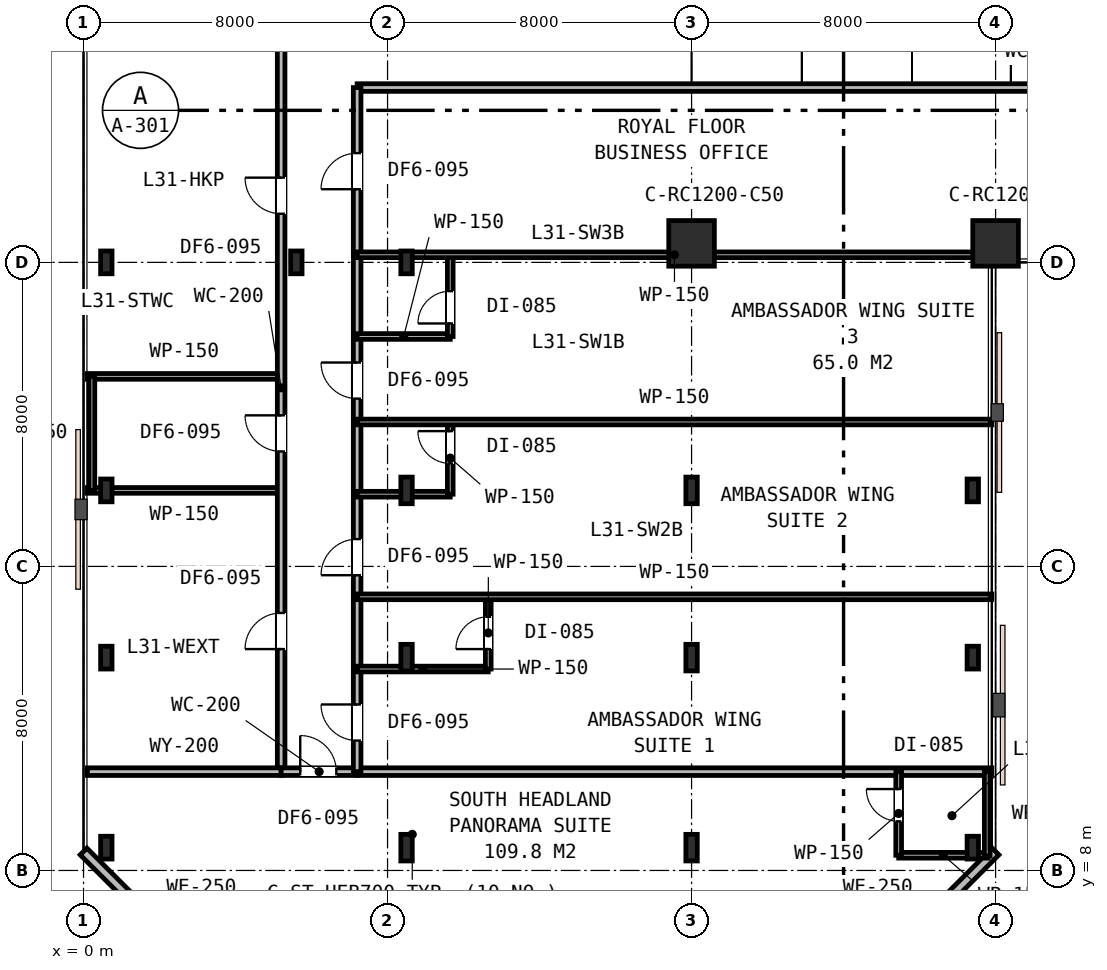
"""IFC4 building model, lengths in metres.
Left out: names, types, materials, properties, quantities, classifications, styles, units other than length and angle.
Written with IfcOpenShell. Run it as: python <this file> out.ifc"""

import sys

from ifc_helpers import new_model, si_unit, direction, frame, frame_2d, origin, origin_2d, place, context, subcontext, project, spatial, rectangle, i_section, extrude, element, fill, save


model = new_model("IFC4")
c1 = context("Model", 3, precision=1e-05, world=origin(), true_north=direction((0.0, 1.0)))
c2 = subcontext(c1, "Body", "Model", "MODEL_VIEW")
j1 = project(units=[si_unit("LENGTHUNIT", "METRE"), si_unit("PLANEANGLEUNIT", "RADIAN")], contexts=[c1])
p1 = place(None, origin())
s1 = spatial("IfcSite", under=j1, at=p1, CompositionType="ELEMENT")
p2 = place(p1, origin())
s2 = spatial("IfcBuilding", under=s1, at=p2, CompositionType="ELEMENT")
p3 = place(p2, frame((0.0, 0.0, 122.4)))
s3 = spatial("IfcBuildingStorey", under=s2, at=p3, CompositionType="ELEMENT", Elevation=122.4)
p4 = place(p3, frame((8.5, 24.0, 0.0), z_axis=(0.0, 0.0, 1.0), x_axis=(1.0, 0.0, 0.0)))
e1 = element("IfcColumn", 1, at=p4, inside=s3, PredefinedType="COLUMN", context=c2, shape_type="SweptSolid", body=[
    extrude(i_section(OverallWidth=0.3, OverallDepth=0.6, WebThickness=0.015, FlangeThickness=0.03, FilletRadius=0.027, at=origin_2d()), origin(), (0.0, 0.0, 1.0), 3.6),
])
for number, where, z_axis, x_axis in (
    (2, (16.0, 24.5, 0.0), (0.0, 0.0, 1.0), (1.0, 0.0, 0.0)),
    (3, (24.0, 24.5, 0.0), (0.0, 0.0, 1.0), (1.0, 0.0, 0.0)),
):
    element("IfcColumn", number, at=place(p3, frame(where, z_axis=z_axis, x_axis=x_axis)), inside=s3, PredefinedType="COLUMN", context=c2, shape_type="SweptSolid", body=[
        extrude(rectangle(XDim=1.2, YDim=1.2, at=origin_2d()), origin(), (0.0, 0.0, 1.0), 3.6),
    ])
for number, where, z_axis, x_axis in (
    (4, (5.6, 24.0, 0.0), (0.0, 0.0, 1.0), (1.0, 0.0, 0.0)),
    (5, (0.6, 24.0, 0.0), (0.0, 0.0, 1.0), (1.0, 0.0, 0.0)),
    (6, (0.6, 8.6, 0.0), (0.0, 0.0, 1.0), (1.0, 0.0, 0.0)),
    (7, (0.6, 13.6, 0.0), (0.0, 0.0, 1.0), (1.0, 0.0, 0.0)),
    (8, (0.6, 18.0, 0.0), (0.0, 0.0, 1.0), (1.0, 0.0, 0.0)),
    (9, (23.4, 8.6, 0.0), (0.0, 0.0, 1.0), (1.0, 0.0, 0.0)),
    (10, (23.4, 13.6, 0.0), (0.0, 0.0, 1.0), (1.0, 0.0, 0.0)),
    (11, (23.4, 18.0, 0.0), (0.0, 0.0, 1.0), (1.0, 0.0, 0.0)),
):
    element("IfcColumn", number, at=place(p3, frame(where, z_axis=z_axis, x_axis=x_axis)), inside=s3, PredefinedType="COLUMN", context=c2, shape_type="SweptSolid", body=[
        extrude(i_section(OverallWidth=0.3, OverallDepth=0.6, WebThickness=0.015, FlangeThickness=0.03, FilletRadius=0.027, at=origin_2d()), origin(), (0.0, 0.0, 1.0), 3.6),
    ])
for number, where, z_axis, x_axis in (
    (12, (8.5, 8.6, 0.0), (0.0, 0.0, 1.0), (1.0, 0.0, 0.0)),
    (13, (16.0, 8.6, 0.0), (0.0, 0.0, 1.0), (1.0, 0.0, 0.0)),
    (14, (8.5, 13.6, 0.0), (0.0, 0.0, 1.0), (1.0, 0.0, 0.0)),
    (15, (16.0, 13.6, 0.0), (0.0, 0.0, 1.0), (1.0, 0.0, 0.0)),
    (16, (8.5, 18.0, 0.0), (0.0, 0.0, 1.0), (1.0, 0.0, 0.0)),
    (17, (16.0, 18.0, 0.0), (0.0, 0.0, 1.0), (1.0, 0.0, 0.0)),
):
    element("IfcColumn", number, at=place(p3, frame(where, z_axis=z_axis, x_axis=x_axis)), inside=s3, PredefinedType="COLUMN", context=c2, shape_type="SweptSolid", body=[
        extrude(i_section(OverallWidth=0.3, OverallDepth=0.7, WebThickness=0.017, FlangeThickness=0.032, FilletRadius=0.027, at=origin_2d()), origin(), (0.0, 0.0, 1.0), 3.6),
    ])
p5 = place(p3, frame((20.5, 5.0, 0.0), z_axis=(0.0, 0.0, 1.0), x_axis=(0.707106781187, 0.707106781187, 0.0)))
e18 = element("IfcWall", 18, at=p5, inside=s3, PredefinedType="STANDARD", context=c2, shape_type="SweptSolid", body=[
    extrude(rectangle(XDim=4.95, YDim=0.25, at=frame_2d((2.475, 0.0))), origin(), (0.0, 0.0, 1.0), 3.33),
])
p6 = place(p5, frame((1.465, 0.0, 0.75)))
e19 = element("IfcOpeningElement", 19, at=p6, cuts=e18, PredefinedType="OPENING", context=c2, shape_type="SweptSolid", body=[
    extrude(rectangle(XDim=1.8, YDim=1.85, at=frame_2d((0.9, 0.925))), frame((0.0, 0.135, 0.0), z_axis=(0.0, -1.0, 0.0), x_axis=(1.0, 0.0, 0.0)), (0.0, 0.0, 1.0), 0.27),
])
p7 = place(p3, frame((0.0, 8.5, 0.0), z_axis=(0.0, 0.0, 1.0), x_axis=(0.707106781187, -0.707106781187, 0.0)))
e20 = element("IfcWall", 20, at=p7, inside=s3, PredefinedType="STANDARD", context=c2, shape_type="SweptSolid", body=[
    extrude(rectangle(XDim=4.95, YDim=0.25, at=frame_2d((2.475, 0.0))), origin(), (0.0, 0.0, 1.0), 3.33),
])
p8 = place(p7, frame((1.575, 0.0, 0.75)))
e21 = element("IfcOpeningElement", 21, at=p8, cuts=e20, PredefinedType="OPENING", context=c2, shape_type="SweptSolid", body=[
    extrude(rectangle(XDim=1.8, YDim=1.85, at=frame_2d((0.9, 0.925))), frame((0.0, 0.135, 0.0), z_axis=(0.0, -1.0, 0.0), x_axis=(1.0, 0.0, 0.0)), (0.0, 0.0, 1.0), 0.27),
])
p9 = place(p3, frame((7.2, 28.6, 0.0), z_axis=(0.0, 0.0, 1.0), x_axis=(1.0, 0.0, 0.0)))
e22 = element("IfcWall", 22, at=p9, inside=s3, PredefinedType="PARTITIONING", context=c2, shape_type="SweptSolid", body=[
    extrude(rectangle(XDim=37.0, YDim=0.2, at=frame_2d((18.5, 0.0))), origin(), (0.0, 0.0, 1.0), 2.87),
])
p10 = place(p9, frame((19.71, 0.0, 0.0)))
e23 = element("IfcOpeningElement", 23, at=p10, cuts=e22, PredefinedType="OPENING", context=c2, shape_type="SweptSolid", body=[
    extrude(rectangle(XDim=0.95, YDim=2.15, at=frame_2d((0.475, 1.075))), frame((0.0, 0.11, 0.0), z_axis=(0.0, -1.0, 0.0), x_axis=(1.0, 0.0, 0.0)), (0.0, 0.0, 1.0), 0.22),
])
p11 = place(p9, frame((29.78, 0.0, 0.0)))
e24 = element("IfcOpeningElement", 24, at=p11, cuts=e22, PredefinedType="OPENING", context=c2, shape_type="SweptSolid", body=[
    extrude(rectangle(XDim=0.95, YDim=2.15, at=frame_2d((0.475, 1.075))), frame((0.0, 0.11, 0.0), z_axis=(0.0, -1.0, 0.0), x_axis=(1.0, 0.0, 0.0)), (0.0, 0.0, 1.0), 0.22),
])
p12 = place(p3, frame((0.1, 18.0, 0.0), z_axis=(0.0, 0.0, 1.0), x_axis=(1.0, 0.0, 0.0)))
e25 = element("IfcWall", 25, at=p12, inside=s3, PredefinedType="PARTITIONING", context=c2, shape_type="SweptSolid", body=[
    extrude(rectangle(XDim=5.1, YDim=0.15, at=frame_2d((2.55, 0.0))), origin(), (0.0, 0.0, 1.0), 2.87),
])
p13 = place(p3, frame((0.1, 21.0, 0.0), z_axis=(0.0, 0.0, 1.0), x_axis=(1.0, 0.0, 0.0)))
e26 = element("IfcWall", 26, at=p13, inside=s3, PredefinedType="PARTITIONING", context=c2, shape_type="SweptSolid", body=[
    extrude(rectangle(XDim=5.1, YDim=0.15, at=frame_2d((2.55, 0.0))), origin(), (0.0, 0.0, 1.0), 2.96),
])
p14 = place(p3, frame((5.2, 10.6, 0.0), z_axis=(0.0, 0.0, 1.0), x_axis=(0.0, 1.0, 0.0)))
e27 = element("IfcWall", 27, at=p14, inside=s3, PredefinedType="PARTITIONING", context=c2, shape_type="SweptSolid", body=[
    extrude(rectangle(XDim=20.2, YDim=0.2, at=frame_2d((10.1, 0.0))), origin(), (0.0, 0.0, 1.0), 2.87),
])
p15 = place(p14, frame((8.425, 0.0, 0.0)))
e28 = element("IfcOpeningElement", 28, at=p15, cuts=e27, PredefinedType="OPENING", context=c2, shape_type="SweptSolid", body=[
    extrude(rectangle(XDim=0.95, YDim=2.15, at=frame_2d((0.475, 1.075))), frame((0.0, 0.11, 0.0), z_axis=(0.0, -1.0, 0.0), x_axis=(1.0, 0.0, 0.0)), (0.0, 0.0, 1.0), 0.22),
])
p16 = place(p14, frame((14.68, 0.0, 0.0)))
e29 = element("IfcOpeningElement", 29, at=p16, cuts=e27, PredefinedType="OPENING", context=c2, shape_type="SweptSolid", body=[
    extrude(rectangle(XDim=0.95, YDim=2.15, at=frame_2d((0.475, 1.075))), frame((0.0, 0.11, 0.0), z_axis=(0.0, -1.0, 0.0), x_axis=(1.0, 0.0, 0.0)), (0.0, 0.0, 1.0), 0.22),
])
p17 = place(p14, frame((3.225, 0.0, 0.0)))
e30 = element("IfcOpeningElement", 30, at=p17, cuts=e27, PredefinedType="OPENING", context=c2, shape_type="SweptSolid", body=[
    extrude(rectangle(XDim=0.95, YDim=2.15, at=frame_2d((0.475, 1.075))), frame((0.0, 0.11, 0.0), z_axis=(0.0, -1.0, 0.0), x_axis=(1.0, 0.0, 0.0)), (0.0, 0.0, 1.0), 0.22),
])
p18 = place(p3, frame((0.22, 18.0, 0.0), z_axis=(0.0, 0.0, 1.0), x_axis=(0.0, 1.0, 0.0)))
e31 = element("IfcWall", 31, at=p18, inside=s3, PredefinedType="PARTITIONING", context=c2, shape_type="SweptSolid", body=[
    extrude(rectangle(XDim=3.0, YDim=0.15, at=frame_2d((1.5, 0.0))), origin(), (0.0, 0.0, 1.0), 2.87),
])
p19 = place(p3, frame((0.1, 10.6, 0.0), z_axis=(0.0, 0.0, 1.0), x_axis=(1.0, 0.0, 0.0)))
e32 = element("IfcWall", 32, at=p19, inside=s3, PredefinedType="PARTITIONING", context=c2, shape_type="SweptSolid", body=[
    extrude(rectangle(XDim=5.1, YDim=0.2, at=frame_2d((2.55, 0.0))), origin(), (0.0, 0.0, 1.0), 2.96),
])
p20 = place(p3, frame((7.2, 10.6, 0.0), z_axis=(0.0, 0.0, 1.0), x_axis=(1.0, 0.0, 0.0)))
e33 = element("IfcWall", 33, at=p20, inside=s3, PredefinedType="PARTITIONING", context=c2, shape_type="SweptSolid", body=[
    extrude(rectangle(XDim=16.7, YDim=0.2, at=frame_2d((8.35, 0.0))), origin(), (0.0, 0.0, 1.0), 2.87),
])
p21 = place(p3, frame((5.2, 10.6, 0.0), z_axis=(0.0, 0.0, 1.0), x_axis=(1.0, 0.0, 0.0)))
e34 = element("IfcWall", 34, at=p21, inside=s3, PredefinedType="PARTITIONING", context=c2, shape_type="SweptSolid", body=[
    extrude(rectangle(XDim=2.0, YDim=0.2, at=frame_2d((1.0, 0.0))), origin(), (0.0, 0.0, 1.0), 3.01),
])
p22 = place(p21, frame((0.502, 0.0, 0.0)))
e35 = element("IfcOpeningElement", 35, at=p22, cuts=e34, PredefinedType="OPENING", context=c2, shape_type="SweptSolid", body=[
    extrude(rectangle(XDim=0.95, YDim=2.15, at=frame_2d((0.475, 1.075))), frame((0.0, 0.11, 0.0), z_axis=(0.0, -1.0, 0.0), x_axis=(1.0, 0.0, 0.0)), (0.0, 0.0, 1.0), 0.22),
])
p23 = place(p3, frame((21.45, 8.4, 0.0), z_axis=(0.0, 0.0, 1.0), x_axis=(1.0, 0.0, 0.0)))
e36 = element("IfcWall", 36, at=p23, inside=s3, PredefinedType="PARTITIONING", context=c2, shape_type="SweptSolid", body=[
    extrude(rectangle(XDim=2.35, YDim=0.15, at=frame_2d((1.175, 0.0))), origin(), (0.0, 0.0, 1.0), 2.87),
])
p24 = place(p3, frame((21.45, 8.4, 0.0), z_axis=(0.0, 0.0, 1.0), x_axis=(0.0, 1.0, 0.0)))
e37 = element("IfcWall", 37, at=p24, inside=s3, PredefinedType="PARTITIONING", context=c2, shape_type="SweptSolid", body=[
    extrude(rectangle(XDim=2.2, YDim=0.15, at=frame_2d((1.1, 0.0))), origin(), (0.0, 0.0, 1.0), 2.87),
])
p25 = place(p24, frame((0.892, 0.0, 0.0)))
e38 = element("IfcOpeningElement", 38, at=p25, cuts=e37, PredefinedType="OPENING", context=c2, shape_type="SweptSolid", body=[
    extrude(rectangle(XDim=0.85, YDim=2.15, at=frame_2d((0.425, 1.075))), frame((0.0, 0.085, 0.0), z_axis=(0.0, -1.0, 0.0), x_axis=(1.0, 0.0, 0.0)), (0.0, 0.0, 1.0), 0.17),
])
p26 = place(p3, frame((23.78, 10.6, 0.0), z_axis=(0.0, 0.0, 1.0), x_axis=(0.0, -1.0, 0.0)))
e39 = element("IfcWall", 39, at=p26, inside=s3, PredefinedType="PARTITIONING", context=c2, shape_type="SweptSolid", body=[
    extrude(rectangle(XDim=2.22, YDim=0.15, at=frame_2d((1.11, 0.0))), origin(), (0.0, 0.0, 1.0), 2.87),
])
p27 = place(p3, frame((7.2, 10.6, 0.0), z_axis=(0.0, 0.0, 1.0), x_axis=(0.0, 1.0, 0.0)))
e40 = element("IfcWall", 40, at=p27, inside=s3, PredefinedType="PARTITIONING", context=c2, shape_type="SweptSolid", body=[
    extrude(rectangle(XDim=18.0, YDim=0.2, at=frame_2d((9.0, 0.0))), origin(), (0.0, 0.0, 1.0), 2.87),
])
p28 = place(p27, frame((0.818, 0.0, 0.0)))
e41 = element("IfcOpeningElement", 41, at=p28, cuts=e40, PredefinedType="OPENING", context=c2, shape_type="SweptSolid", body=[
    extrude(rectangle(XDim=0.95, YDim=2.15, at=frame_2d((0.475, 1.075))), frame((0.0, 0.11, 0.0), z_axis=(0.0, -1.0, 0.0), x_axis=(1.0, 0.0, 0.0)), (0.0, 0.0, 1.0), 0.22),
])
p29 = place(p27, frame((5.169, 0.0, 0.0)))
e42 = element("IfcOpeningElement", 42, at=p29, cuts=e40, PredefinedType="OPENING", context=c2, shape_type="SweptSolid", body=[
    extrude(rectangle(XDim=0.95, YDim=2.15, at=frame_2d((0.475, 1.075))), frame((0.0, 0.11, 0.0), z_axis=(0.0, -1.0, 0.0), x_axis=(1.0, 0.0, 0.0)), (0.0, 0.0, 1.0), 0.22),
])
p30 = place(p27, frame((9.815, 0.0, 0.0)))
e43 = element("IfcOpeningElement", 43, at=p30, cuts=e40, PredefinedType="OPENING", context=c2, shape_type="SweptSolid", body=[
    extrude(rectangle(XDim=0.95, YDim=2.15, at=frame_2d((0.475, 1.075))), frame((0.0, 0.11, 0.0), z_axis=(0.0, -1.0, 0.0), x_axis=(1.0, 0.0, 0.0)), (0.0, 0.0, 1.0), 0.22),
])
p31 = place(p27, frame((15.325, 0.0, 0.0)))
e44 = element("IfcOpeningElement", 44, at=p31, cuts=e40, PredefinedType="OPENING", context=c2, shape_type="SweptSolid", body=[
    extrude(rectangle(XDim=0.95, YDim=2.15, at=frame_2d((0.475, 1.075))), frame((0.0, 0.11, 0.0), z_axis=(0.0, -1.0, 0.0), x_axis=(1.0, 0.0, 0.0)), (0.0, 0.0, 1.0), 0.22),
])
p32 = place(p3, frame((7.2, 13.3, 0.0), z_axis=(0.0, 0.0, 1.0), x_axis=(1.0, 0.0, 0.0)))
e45 = element("IfcWall", 45, at=p32, inside=s3, PredefinedType="PARTITIONING", context=c2, shape_type="SweptSolid", body=[
    extrude(rectangle(XDim=3.45, YDim=0.15, at=frame_2d((1.725, 0.0))), origin(), (0.0, 0.0, 1.0), 2.87),
])
p33 = place(p3, frame((10.65, 13.3, 0.0), z_axis=(0.0, 0.0, 1.0), x_axis=(0.0, 1.0, 0.0)))
e46 = element("IfcWall", 46, at=p33, inside=s3, PredefinedType="PARTITIONING", context=c2, shape_type="SweptSolid", body=[
    extrude(rectangle(XDim=1.9, YDim=0.15, at=frame_2d((0.95, 0.0))), origin(), (0.0, 0.0, 1.0), 2.87),
])
p34 = place(p33, frame((0.525, 0.0, 0.0)))
e47 = element("IfcOpeningElement", 47, at=p34, cuts=e46, PredefinedType="OPENING", context=c2, shape_type="SweptSolid", body=[
    extrude(rectangle(XDim=0.85, YDim=2.15, at=frame_2d((0.425, 1.075))), frame((0.0, 0.085, 0.0), z_axis=(0.0, -1.0, 0.0), x_axis=(1.0, 0.0, 0.0)), (0.0, 0.0, 1.0), 0.17),
])
p35 = place(p3, frame((7.2, 15.2, 0.0), z_axis=(0.0, 0.0, 1.0), x_axis=(1.0, 0.0, 0.0)))
e48 = element("IfcWall", 48, at=p35, inside=s3, PredefinedType="PARTITIONING", context=c2, shape_type="SweptSolid", body=[
    extrude(rectangle(XDim=16.7, YDim=0.15, at=frame_2d((8.35, 0.0))), origin(), (0.0, 0.0, 1.0), 2.87),
])
p36 = place(p3, frame((7.2, 17.9, 0.0), z_axis=(0.0, 0.0, 1.0), x_axis=(1.0, 0.0, 0.0)))
e49 = element("IfcWall", 49, at=p36, inside=s3, PredefinedType="PARTITIONING", context=c2, shape_type="SweptSolid", body=[
    extrude(rectangle(XDim=2.45, YDim=0.15, at=frame_2d((1.225, 0.0))), origin(), (0.0, 0.0, 1.0), 2.87),
])
p37 = place(p3, frame((9.65, 17.9, 0.0), z_axis=(0.0, 0.0, 1.0), x_axis=(0.0, 1.0, 0.0)))
e50 = element("IfcWall", 50, at=p37, inside=s3, PredefinedType="PARTITIONING", context=c2, shape_type="SweptSolid", body=[
    extrude(rectangle(XDim=1.9, YDim=0.15, at=frame_2d((0.95, 0.0))), origin(), (0.0, 0.0, 1.0), 2.87),
])
p38 = place(p37, frame((0.81, 0.0, 0.0)))
e51 = element("IfcOpeningElement", 51, at=p38, cuts=e50, PredefinedType="OPENING", context=c2, shape_type="SweptSolid", body=[
    extrude(rectangle(XDim=0.85, YDim=2.15, at=frame_2d((0.425, 1.075))), frame((0.0, 0.085, 0.0), z_axis=(0.0, -1.0, 0.0), x_axis=(1.0, 0.0, 0.0)), (0.0, 0.0, 1.0), 0.17),
])
p39 = place(p3, frame((7.2, 19.8, 0.0), z_axis=(0.0, 0.0, 1.0), x_axis=(1.0, 0.0, 0.0)))
e52 = element("IfcWall", 52, at=p39, inside=s3, PredefinedType="PARTITIONING", context=c2, shape_type="SweptSolid", body=[
    extrude(rectangle(XDim=16.7, YDim=0.15, at=frame_2d((8.35, 0.0))), origin(), (0.0, 0.0, 1.0), 2.87),
])
p40 = place(p3, frame((7.2, 22.05, 0.0), z_axis=(0.0, 0.0, 1.0), x_axis=(1.0, 0.0, 0.0)))
e53 = element("IfcWall", 53, at=p40, inside=s3, PredefinedType="PARTITIONING", context=c2, shape_type="SweptSolid", body=[
    extrude(rectangle(XDim=2.45, YDim=0.15, at=frame_2d((1.225, 0.0))), origin(), (0.0, 0.0, 1.0), 2.87),
])
p41 = place(p3, frame((9.65, 22.05, 0.0), z_axis=(0.0, 0.0, 1.0), x_axis=(0.0, 1.0, 0.0)))
e54 = element("IfcWall", 54, at=p41, inside=s3, PredefinedType="PARTITIONING", context=c2, shape_type="SweptSolid", body=[
    extrude(rectangle(XDim=2.15, YDim=0.15, at=frame_2d((1.075, 0.0))), origin(), (0.0, 0.0, 1.0), 2.87),
])
p42 = place(p41, frame((0.343, 0.0, 0.0)))
e55 = element("IfcOpeningElement", 55, at=p42, cuts=e54, PredefinedType="OPENING", context=c2, shape_type="SweptSolid", body=[
    extrude(rectangle(XDim=0.85, YDim=2.15, at=frame_2d((0.425, 1.075))), frame((0.0, 0.085, 0.0), z_axis=(0.0, -1.0, 0.0), x_axis=(1.0, 0.0, 0.0)), (0.0, 0.0, 1.0), 0.17),
])
p43 = place(p3, frame((7.2, 24.2, 0.0), z_axis=(0.0, 0.0, 1.0), x_axis=(1.0, 0.0, 0.0)))
e56 = element("IfcWall", 56, at=p43, inside=s3, PredefinedType="PARTITIONING", context=c2, shape_type="SweptSolid", body=[
    extrude(rectangle(XDim=16.7, YDim=0.15, at=frame_2d((8.35, 0.0))), origin(), (0.0, 0.0, 1.0), 2.87),
])
p44 = place(p15, origin())
e57 = element("IfcDoor", 57, at=p44, inside=s3, OperationType="SINGLE_SWING_RIGHT", PredefinedType="DOOR", context=c2, shape_type="SweptSolid", body=[
    extrude(rectangle(XDim=0.95, YDim=2.15, at=frame_2d((0.475, 1.075))), frame((0.0, 0.025, 0.0), z_axis=(0.0, -1.0, 0.0), x_axis=(1.0, 0.0, 0.0)), (0.0, 0.0, 1.0), 0.05),
])
fill(e28, e57)
p45 = place(p16, origin())
e58 = element("IfcDoor", 58, at=p45, inside=s3, OperationType="SINGLE_SWING_RIGHT", PredefinedType="DOOR", context=c2, shape_type="SweptSolid", body=[
    extrude(rectangle(XDim=0.95, YDim=2.15, at=frame_2d((0.475, 1.075))), frame((0.0, 0.025, 0.0), z_axis=(0.0, -1.0, 0.0), x_axis=(1.0, 0.0, 0.0)), (0.0, 0.0, 1.0), 0.05),
])
fill(e29, e58)
p46 = place(p17, origin())
e59 = element("IfcDoor", 59, at=p46, inside=s3, OperationType="SINGLE_SWING_LEFT", PredefinedType="DOOR", context=c2, shape_type="SweptSolid", body=[
    extrude(rectangle(XDim=0.95, YDim=2.15, at=frame_2d((0.475, 1.075))), frame((0.0, 0.025, 0.0), z_axis=(0.0, -1.0, 0.0), x_axis=(1.0, 0.0, 0.0)), (0.0, 0.0, 1.0), 0.05),
])
fill(e30, e59)
p47 = place(p22, origin())
e60 = element("IfcDoor", 60, at=p47, inside=s3, OperationType="SINGLE_SWING_LEFT", PredefinedType="DOOR", context=c2, shape_type="SweptSolid", body=[
    extrude(rectangle(XDim=0.95, YDim=2.15, at=frame_2d((0.475, 1.075))), frame((0.0, 0.025, 0.0), z_axis=(0.0, -1.0, 0.0), x_axis=(1.0, 0.0, 0.0)), (0.0, 0.0, 1.0), 0.05),
])
fill(e35, e60)
p48 = place(p25, origin())
e61 = element("IfcDoor", 61, at=p48, inside=s3, OperationType="SINGLE_SWING_RIGHT", PredefinedType="DOOR", context=c2, shape_type="SweptSolid", body=[
    extrude(rectangle(XDim=0.85, YDim=2.15, at=frame_2d((0.425, 1.075))), frame((0.0, 0.025, 0.0), z_axis=(0.0, -1.0, 0.0), x_axis=(1.0, 0.0, 0.0)), (0.0, 0.0, 1.0), 0.05),
])
fill(e38, e61)
p49 = place(p28, origin())
e62 = element("IfcDoor", 62, at=p49, inside=s3, OperationType="SINGLE_SWING_RIGHT", PredefinedType="DOOR", context=c2, shape_type="SweptSolid", body=[
    extrude(rectangle(XDim=0.95, YDim=2.15, at=frame_2d((0.475, 1.075))), frame((0.0, 0.025, 0.0), z_axis=(0.0, -1.0, 0.0), x_axis=(1.0, 0.0, 0.0)), (0.0, 0.0, 1.0), 0.05),
])
fill(e41, e62)
p50 = place(p34, origin())
e63 = element("IfcDoor", 63, at=p50, inside=s3, OperationType="SINGLE_SWING_LEFT", PredefinedType="DOOR", context=c2, shape_type="SweptSolid", body=[
    extrude(rectangle(XDim=0.85, YDim=2.15, at=frame_2d((0.425, 1.075))), frame((0.0, 0.025, 0.0), z_axis=(0.0, -1.0, 0.0), x_axis=(1.0, 0.0, 0.0)), (0.0, 0.0, 1.0), 0.05),
])
fill(e47, e63)
p51 = place(p29, origin())
e64 = element("IfcDoor", 64, at=p51, inside=s3, OperationType="SINGLE_SWING_LEFT", PredefinedType="DOOR", context=c2, shape_type="SweptSolid", body=[
    extrude(rectangle(XDim=0.95, YDim=2.15, at=frame_2d((0.475, 1.075))), frame((0.0, 0.025, 0.0), z_axis=(0.0, -1.0, 0.0), x_axis=(1.0, 0.0, 0.0)), (0.0, 0.0, 1.0), 0.05),
])
fill(e42, e64)
p52 = place(p38, origin())
e65 = element("IfcDoor", 65, at=p52, inside=s3, OperationType="SINGLE_SWING_RIGHT", PredefinedType="DOOR", context=c2, shape_type="SweptSolid", body=[
    extrude(rectangle(XDim=0.85, YDim=2.15, at=frame_2d((0.425, 1.075))), frame((0.0, 0.025, 0.0), z_axis=(0.0, -1.0, 0.0), x_axis=(1.0, 0.0, 0.0)), (0.0, 0.0, 1.0), 0.05),
])
fill(e51, e65)
p53 = place(p30, origin())
e66 = element("IfcDoor", 66, at=p53, inside=s3, OperationType="SINGLE_SWING_RIGHT", PredefinedType="DOOR", context=c2, shape_type="SweptSolid", body=[
    extrude(rectangle(XDim=0.95, YDim=2.15, at=frame_2d((0.475, 1.075))), frame((0.0, 0.025, 0.0), z_axis=(0.0, -1.0, 0.0), x_axis=(1.0, 0.0, 0.0)), (0.0, 0.0, 1.0), 0.05),
])
fill(e43, e66)
p54 = place(p42, origin())
e67 = element("IfcDoor", 67, at=p54, inside=s3, OperationType="SINGLE_SWING_LEFT", PredefinedType="DOOR", context=c2, shape_type="SweptSolid", body=[
    extrude(rectangle(XDim=0.85, YDim=2.15, at=frame_2d((0.425, 1.075))), frame((0.0, 0.025, 0.0), z_axis=(0.0, -1.0, 0.0), x_axis=(1.0, 0.0, 0.0)), (0.0, 0.0, 1.0), 0.05),
])
fill(e55, e67)
p55 = place(p31, origin())
e68 = element("IfcDoor", 68, at=p55, inside=s3, OperationType="SINGLE_SWING_LEFT", PredefinedType="DOOR", context=c2, shape_type="SweptSolid", body=[
    extrude(rectangle(XDim=0.95, YDim=2.15, at=frame_2d((0.475, 1.075))), frame((0.0, 0.025, 0.0), z_axis=(0.0, -1.0, 0.0), x_axis=(1.0, 0.0, 0.0)), (0.0, 0.0, 1.0), 0.05),
])
fill(e44, e68)
save(model, sys.argv[1])
